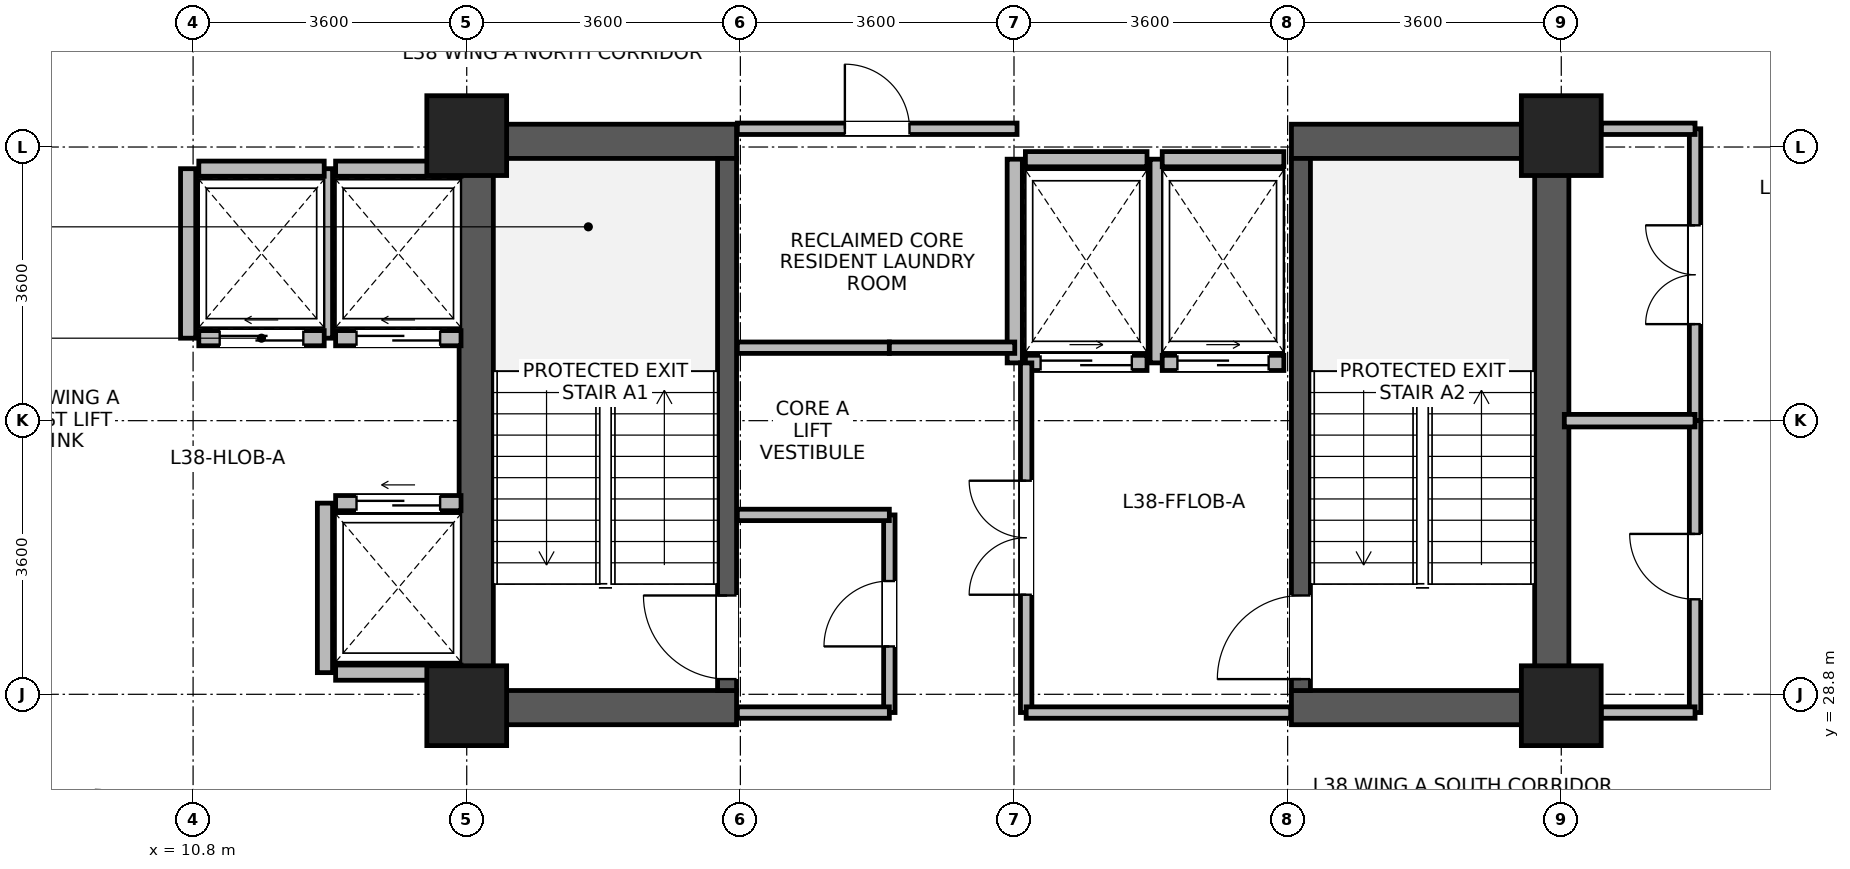
"""IFC4 building model, lengths in metres.
Left out: names, types, materials, properties, quantities, classifications, styles, units other than length and angle.
Written with IfcOpenShell. Run it as: python <this file> out.ifc"""

import sys

from ifc_helpers import new_model, si_unit, direction, frame, frame_2d, origin, origin_2d, place, context, subcontext, project, spatial, rectangle, extrude, source, transform, mapped, element, fill, save


model = new_model("IFC4")
c1 = context("Model", 3, precision=1e-05, world=origin(), true_north=direction((0.0, 1.0)))
c2 = subcontext(c1, "Body", "Model", "MODEL_VIEW")
j1 = project(units=[si_unit("LENGTHUNIT", "METRE"), si_unit("PLANEANGLEUNIT", "RADIAN")], contexts=[c1])
p1 = place(None, origin())
s1 = spatial("IfcSite", under=j1, at=p1, CompositionType="ELEMENT")
p2 = place(p1, origin())
s2 = spatial("IfcBuilding", under=s1, at=p2, CompositionType="ELEMENT")
p3 = place(p2, frame((0.0, 0.0, 151.3)))
s3 = spatial("IfcBuildingStorey", under=s2, at=p3, CompositionType="ELEMENT", Elevation=151.3)
for number, where, z_axis, x_axis in (
    (1, (14.525, 28.4, 0.0), (0.0, 0.0, 1.0), (0.0, 1.0, 0.0)),
    (2, (28.675, 28.4, 0.0), (0.0, 0.0, 1.0), (0.0, 1.0, 0.0)),
):
    element("IfcWall", number, at=place(p3, frame(where, z_axis=z_axis, x_axis=x_axis)), inside=s3, PredefinedType="SHEAR", context=c2, shape_type="SweptSolid", body=[
        extrude(rectangle(XDim=7.9, YDim=0.45, at=frame_2d((3.95, 0.0))), origin(), (0.0, 0.0, 1.0), 3.46),
    ])
for number, where, z_axis, x_axis in (
    (3, (14.75, 28.625, 0.0), (0.0, 0.0, 1.0), (1.0, 0.0, 0.0)),
    (4, (25.25, 28.625, 0.0), (0.0, 0.0, 1.0), (1.0, 0.0, 0.0)),
    (5, (14.75, 36.075, 0.0), (0.0, 0.0, 1.0), (1.0, 0.0, 0.0)),
    (6, (25.25, 36.075, 0.0), (0.0, 0.0, 1.0), (1.0, 0.0, 0.0)),
):
    element("IfcWall", number, at=place(p3, frame(where, z_axis=z_axis, x_axis=x_axis)), inside=s3, PredefinedType="SHEAR", context=c2, shape_type="SweptSolid", body=[
        extrude(rectangle(XDim=3.2, YDim=0.45, at=frame_2d((1.6, 0.0))), origin(), (0.0, 0.0, 1.0), 3.46),
    ])
p4 = place(p3, frame((17.825, 28.85, 0.0), z_axis=(0.0, 0.0, 1.0), x_axis=(0.0, 1.0, 0.0)))
e7 = element("IfcWall", 7, at=p4, inside=s3, PredefinedType="SHEAR", context=c2, shape_type="SweptSolid", body=[
    extrude(rectangle(XDim=7.0, YDim=0.25, at=frame_2d((3.5, 0.0))), origin(), (0.0, 0.0, 1.0), 3.46),
])
p5 = place(p4, frame((0.15, 0.0, 0.0)))
e8 = element("IfcOpeningElement", 8, at=p5, cuts=e7, PredefinedType="OPENING", context=c2, shape_type="SweptSolid", body=[
    extrude(rectangle(XDim=1.1, YDim=2.08, at=frame_2d((0.55, 1.04))), frame((0.0, 0.135, 0.0), z_axis=(0.0, -1.0, 0.0), x_axis=(1.0, 0.0, 0.0)), (0.0, 0.0, 1.0), 0.27),
])
p6 = place(p3, frame((25.375, 28.85, 0.0), z_axis=(0.0, 0.0, 1.0), x_axis=(0.0, 1.0, 0.0)))
e9 = element("IfcWall", 9, at=p6, inside=s3, PredefinedType="SHEAR", context=c2, shape_type="SweptSolid", body=[
    extrude(rectangle(XDim=7.0, YDim=0.25, at=frame_2d((3.5, 0.0))), origin(), (0.0, 0.0, 1.0), 3.46),
])
p7 = place(p6, frame((0.15, 0.0, 0.0)))
e10 = element("IfcOpeningElement", 10, at=p7, cuts=e9, PredefinedType="OPENING", context=c2, shape_type="SweptSolid", body=[
    extrude(rectangle(XDim=1.1, YDim=2.08, at=frame_2d((0.55, 1.04))), frame((0.0, 0.135, 0.0), z_axis=(0.0, -1.0, 0.0), x_axis=(1.0, 0.0, 0.0)), (0.0, 0.0, 1.0), 0.27),
])
m1 = source(origin(), c2, "Body", "SweptSolid", [
    extrude(rectangle(XDim=1.05, YDim=1.05, at=origin_2d()), origin(), (0.0, 0.0, 1.0), 3.7),
])
for number, where, z_axis, x_axis in (
    (11, (14.4, 28.65, 0.0), (0.0, 0.0, 1.0), (1.0, 0.0, 0.0)),
    (12, (14.4, 36.15, 0.0), (0.0, 0.0, 1.0), (1.0, 0.0, 0.0)),
    (13, (28.8, 28.65, 0.0), (0.0, 0.0, 1.0), (1.0, 0.0, 0.0)),
    (14, (28.8, 36.15, 0.0), (0.0, 0.0, 1.0), (1.0, 0.0, 0.0)),
):
    element("IfcColumn", number, at=place(p3, frame(where, z_axis=z_axis, x_axis=x_axis)), inside=s3, PredefinedType="COLUMN", context=c2, shape_type="MappedRepresentation", body=[
        mapped(m1, transform((0.0, 0.0, 0.0), x_axis=(1.0, 0.0, 0.0), y_axis=(0.0, 1.0, 0.0), z_axis=(0.0, 0.0, 1.0), scale=1.0)),
    ])
p8 = place(p3, frame((12.675, 33.485, 0.0), z_axis=(0.0, 0.0, 1.0), x_axis=(1.0, 0.0, 0.0)))
e15 = element("IfcWall", 15, at=p8, inside=s3, PredefinedType="PARTITIONING", context=c2, shape_type="SweptSolid", body=[
    extrude(rectangle(XDim=1.65, YDim=0.2, at=frame_2d((0.825, 0.0))), origin(), (0.0, 0.0, 1.0), 3.44),
])
p9 = place(p8, frame((0.275, 0.0, 0.0)))
e16 = element("IfcOpeningElement", 16, at=p9, cuts=e15, PredefinedType="OPENING", context=c2, shape_type="SweptSolid", body=[
    extrude(rectangle(XDim=1.1, YDim=2.12, at=frame_2d((0.55, 1.06))), frame((0.0, 0.11, 0.0), z_axis=(0.0, -1.0, 0.0), x_axis=(1.0, 0.0, 0.0)), (0.0, 0.0, 1.0), 0.22),
])
p10 = place(p3, frame((12.675, 35.715, 0.0), z_axis=(0.0, 0.0, 1.0), x_axis=(1.0, 0.0, 0.0)))
e17 = element("IfcWall", 17, at=p10, inside=s3, PredefinedType="PARTITIONING", context=c2, shape_type="SweptSolid", body=[
    extrude(rectangle(XDim=1.65, YDim=0.2, at=frame_2d((0.825, 0.0))), origin(), (0.0, 0.0, 1.0), 3.44),
])
p11 = place(p3, frame((12.535, 33.485, 0.0), z_axis=(0.0, 0.0, 1.0), x_axis=(0.0, 1.0, 0.0)))
e18 = element("IfcWall", 18, at=p11, inside=s3, PredefinedType="PARTITIONING", context=c2, shape_type="SweptSolid", body=[
    extrude(rectangle(XDim=2.23, YDim=0.2, at=frame_2d((1.115, 0.0))), origin(), (0.0, 0.0, 1.0), 3.44),
])
p12 = place(p3, frame((12.675, 29.085, 0.0), z_axis=(0.0, 0.0, 1.0), x_axis=(1.0, 0.0, 0.0)))
e19 = element("IfcWall", 19, at=p12, inside=s3, PredefinedType="PARTITIONING", context=c2, shape_type="SweptSolid", body=[
    extrude(rectangle(XDim=1.65, YDim=0.2, at=frame_2d((0.825, 0.0))), origin(), (0.0, 0.0, 1.0), 3.44),
])
p13 = place(p3, frame((12.675, 31.315, 0.0), z_axis=(0.0, 0.0, 1.0), x_axis=(1.0, 0.0, 0.0)))
e20 = element("IfcWall", 20, at=p13, inside=s3, PredefinedType="PARTITIONING", context=c2, shape_type="SweptSolid", body=[
    extrude(rectangle(XDim=1.65, YDim=0.2, at=frame_2d((0.825, 0.0))), origin(), (0.0, 0.0, 1.0), 3.44),
])
p14 = place(p13, frame((0.275, 0.0, 0.0)))
e21 = element("IfcOpeningElement", 21, at=p14, cuts=e20, PredefinedType="OPENING", context=c2, shape_type="SweptSolid", body=[
    extrude(rectangle(XDim=1.1, YDim=2.12, at=frame_2d((0.55, 1.06))), frame((0.0, 0.11, 0.0), z_axis=(0.0, -1.0, 0.0), x_axis=(1.0, 0.0, 0.0)), (0.0, 0.0, 1.0), 0.22),
])
p15 = place(p3, frame((12.535, 29.085, 0.0), z_axis=(0.0, 0.0, 1.0), x_axis=(0.0, 1.0, 0.0)))
e22 = element("IfcWall", 22, at=p15, inside=s3, PredefinedType="PARTITIONING", context=c2, shape_type="SweptSolid", body=[
    extrude(rectangle(XDim=2.23, YDim=0.2, at=frame_2d((1.115, 0.0))), origin(), (0.0, 0.0, 1.0), 3.44),
])
p16 = place(p3, frame((10.875, 33.485, 0.0), z_axis=(0.0, 0.0, 1.0), x_axis=(1.0, 0.0, 0.0)))
e23 = element("IfcWall", 23, at=p16, inside=s3, PredefinedType="PARTITIONING", context=c2, shape_type="SweptSolid", body=[
    extrude(rectangle(XDim=1.65, YDim=0.2, at=frame_2d((0.825, 0.0))), origin(), (0.0, 0.0, 1.0), 3.44),
])
p17 = place(p16, frame((0.275, 0.0, 0.0)))
e24 = element("IfcOpeningElement", 24, at=p17, cuts=e23, PredefinedType="OPENING", context=c2, shape_type="SweptSolid", body=[
    extrude(rectangle(XDim=1.1, YDim=2.12, at=frame_2d((0.55, 1.06))), frame((0.0, 0.11, 0.0), z_axis=(0.0, -1.0, 0.0), x_axis=(1.0, 0.0, 0.0)), (0.0, 0.0, 1.0), 0.22),
])
p18 = place(p3, frame((10.875, 35.715, 0.0), z_axis=(0.0, 0.0, 1.0), x_axis=(1.0, 0.0, 0.0)))
e25 = element("IfcWall", 25, at=p18, inside=s3, PredefinedType="PARTITIONING", context=c2, shape_type="SweptSolid", body=[
    extrude(rectangle(XDim=1.65, YDim=0.2, at=frame_2d((0.825, 0.0))), origin(), (0.0, 0.0, 1.0), 3.44),
])
p19 = place(p3, frame((10.735, 33.485, 0.0), z_axis=(0.0, 0.0, 1.0), x_axis=(0.0, 1.0, 0.0)))
e26 = element("IfcWall", 26, at=p19, inside=s3, PredefinedType="PARTITIONING", context=c2, shape_type="SweptSolid", body=[
    extrude(rectangle(XDim=2.23, YDim=0.2, at=frame_2d((1.115, 0.0))), origin(), (0.0, 0.0, 1.0), 3.44),
])
p20 = place(p3, frame((21.75, 33.16, 0.0), z_axis=(0.0, 0.0, 1.0), x_axis=(1.0, 0.0, 0.0)))
e27 = element("IfcWall", 27, at=p20, inside=s3, PredefinedType="PARTITIONING", context=c2, shape_type="SweptSolid", body=[
    extrude(rectangle(XDim=1.6, YDim=0.2, at=frame_2d((0.8, 0.0))), origin(), (0.0, 0.0, 1.0), 3.44),
])
p21 = place(p20, frame((0.2, 0.0, 0.0)))
e28 = element("IfcOpeningElement", 28, at=p21, cuts=e27, PredefinedType="OPENING", context=c2, shape_type="SweptSolid", body=[
    extrude(rectangle(XDim=1.2, YDim=2.12, at=frame_2d((0.6, 1.06))), frame((0.0, 0.11, 0.0), z_axis=(0.0, -1.0, 0.0), x_axis=(1.0, 0.0, 0.0)), (0.0, 0.0, 1.0), 0.22),
])
p22 = place(p3, frame((21.75, 35.84, 0.0), z_axis=(0.0, 0.0, 1.0), x_axis=(1.0, 0.0, 0.0)))
e29 = element("IfcWall", 29, at=p22, inside=s3, PredefinedType="PARTITIONING", context=c2, shape_type="SweptSolid", body=[
    extrude(rectangle(XDim=1.6, YDim=0.2, at=frame_2d((0.8, 0.0))), origin(), (0.0, 0.0, 1.0), 2.44),
])
for number, where, z_axis, x_axis in (
    (30, (21.61, 33.16, 0.0), (0.0, 0.0, 1.0), (0.0, 1.0, 0.0)),
    (31, (23.49, 33.16, 0.0), (0.0, 0.0, 1.0), (0.0, 1.0, 0.0)),
):
    element("IfcWall", number, at=place(p3, frame(where, z_axis=z_axis, x_axis=x_axis)), inside=s3, PredefinedType="PARTITIONING", context=c2, shape_type="SweptSolid", body=[
        extrude(rectangle(XDim=2.68, YDim=0.2, at=frame_2d((1.34, 0.0))), origin(), (0.0, 0.0, 1.0), 3.44),
    ])
p23 = place(p3, frame((23.55, 33.16, 0.0), z_axis=(0.0, 0.0, 1.0), x_axis=(1.0, 0.0, 0.0)))
e32 = element("IfcWall", 32, at=p23, inside=s3, PredefinedType="PARTITIONING", context=c2, shape_type="SweptSolid", body=[
    extrude(rectangle(XDim=1.6, YDim=0.2, at=frame_2d((0.8, 0.0))), origin(), (0.0, 0.0, 1.0), 3.44),
])
p24 = place(p23, frame((0.2, 0.0, 0.0)))
e33 = element("IfcOpeningElement", 33, at=p24, cuts=e32, PredefinedType="OPENING", context=c2, shape_type="SweptSolid", body=[
    extrude(rectangle(XDim=1.2, YDim=2.12, at=frame_2d((0.6, 1.06))), frame((0.0, 0.11, 0.0), z_axis=(0.0, -1.0, 0.0), x_axis=(1.0, 0.0, 0.0)), (0.0, 0.0, 1.0), 0.22),
])
p25 = place(p3, frame((23.55, 35.84, 0.0), z_axis=(0.0, 0.0, 1.0), x_axis=(1.0, 0.0, 0.0)))
e34 = element("IfcWall", 34, at=p25, inside=s3, PredefinedType="PARTITIONING", context=c2, shape_type="SweptSolid", body=[
    extrude(rectangle(XDim=1.6, YDim=0.2, at=frame_2d((0.8, 0.0))), origin(), (0.0, 0.0, 1.0), 2.44),
])
p26 = place(p3, frame((30.56, 32.4, 0.0), z_axis=(0.0, 0.0, 1.0), x_axis=(0.0, 1.0, 0.0)))
e35 = element("IfcWall", 35, at=p26, inside=s3, PredefinedType="PARTITIONING", context=c2, shape_type="SweptSolid", body=[
    extrude(rectangle(XDim=3.84, YDim=0.15, at=frame_2d((1.92, 0.0))), origin(), (0.0, 0.0, 1.0), 3.44),
])
p27 = place(p26, frame((1.27, 0.0, 0.0)))
e36 = element("IfcOpeningElement", 36, at=p27, cuts=e35, PredefinedType="OPENING", context=c2, shape_type="SweptSolid", body=[
    extrude(rectangle(XDim=1.3, YDim=2.12, at=frame_2d((0.65, 1.06))), frame((0.0, 0.085, 0.0), z_axis=(0.0, -1.0, 0.0), x_axis=(1.0, 0.0, 0.0)), (0.0, 0.0, 1.0), 0.17),
])
p28 = place(p3, frame((30.56, 28.56, 0.0), z_axis=(0.0, 0.0, 1.0), x_axis=(0.0, 1.0, 0.0)))
e37 = element("IfcWall", 37, at=p28, inside=s3, PredefinedType="PARTITIONING", context=c2, shape_type="SweptSolid", body=[
    extrude(rectangle(XDim=3.84, YDim=0.15, at=frame_2d((1.92, 0.0))), origin(), (0.0, 0.0, 1.0), 3.44),
])
p29 = place(p28, frame((1.49, 0.0, 0.0)))
e38 = element("IfcOpeningElement", 38, at=p29, cuts=e37, PredefinedType="OPENING", context=c2, shape_type="SweptSolid", body=[
    extrude(rectangle(XDim=0.86, YDim=2.02, at=frame_2d((0.43, 1.01))), frame((0.0, 0.085, 0.0), z_axis=(0.0, -1.0, 0.0), x_axis=(1.0, 0.0, 0.0)), (0.0, 0.0, 1.0), 0.17),
])
p30 = place(p3, frame((17.96, 36.24, 0.0), z_axis=(0.0, 0.0, 1.0), x_axis=(1.0, 0.0, 0.0)))
e39 = element("IfcWall", 39, at=p30, inside=s3, PredefinedType="PARTITIONING", context=c2, shape_type="SweptSolid", body=[
    extrude(rectangle(XDim=3.68, YDim=0.15, at=frame_2d((1.84, 0.0))), origin(), (0.0, 0.0, 1.0), 2.44),
])
p31 = place(p30, frame((1.415, 0.0, 0.0)))
e40 = element("IfcOpeningElement", 40, at=p31, cuts=e39, PredefinedType="OPENING", context=c2, shape_type="SweptSolid", body=[
    extrude(rectangle(XDim=0.85, YDim=2.04, at=frame_2d((0.425, 1.02))), frame((0.0, 0.085, 0.0), z_axis=(0.0, -1.0, 0.0), x_axis=(1.0, 0.0, 0.0)), (0.0, 0.0, 1.0), 0.17),
])
p32 = place(p3, frame((19.96, 28.56, 0.0), z_axis=(0.0, 0.0, 1.0), x_axis=(0.0, 1.0, 0.0)))
e41 = element("IfcWall", 41, at=p32, inside=s3, PredefinedType="PARTITIONING", context=c2, shape_type="SweptSolid", body=[
    extrude(rectangle(XDim=2.6, YDim=0.15, at=frame_2d((1.3, 0.0))), origin(), (0.0, 0.0, 1.0), 3.44),
])
p33 = place(p32, frame((0.87, 0.0, 0.0)))
e42 = element("IfcOpeningElement", 42, at=p33, cuts=e41, PredefinedType="OPENING", context=c2, shape_type="SweptSolid", body=[
    extrude(rectangle(XDim=0.86, YDim=2.02, at=frame_2d((0.43, 1.01))), frame((0.0, 0.085, 0.0), z_axis=(0.0, -1.0, 0.0), x_axis=(1.0, 0.0, 0.0)), (0.0, 0.0, 1.0), 0.17),
])
p34 = place(p3, frame((17.96, 28.56, 0.0), z_axis=(0.0, 0.0, 1.0), x_axis=(1.0, 0.0, 0.0)))
e43 = element("IfcWall", 43, at=p34, inside=s3, PredefinedType="PARTITIONING", context=c2, shape_type="SweptSolid", body=[
    extrude(rectangle(XDim=2.0, YDim=0.15, at=frame_2d((1.0, 0.0))), origin(), (0.0, 0.0, 1.0), 2.44),
])
for number, where, z_axis, x_axis in (
    (44, (17.96, 31.16, 0.0), (0.0, 0.0, 1.0), (1.0, 0.0, 0.0)),
    (45, (17.96, 33.36, 0.0), (0.0, 0.0, 1.0), (1.0, 0.0, 0.0)),
):
    element("IfcWall", number, at=place(p3, frame(where, z_axis=z_axis, x_axis=x_axis)), inside=s3, PredefinedType="PARTITIONING", context=c2, shape_type="SweptSolid", body=[
        extrude(rectangle(XDim=2.0, YDim=0.15, at=frame_2d((1.0, 0.0))), origin(), (0.0, 0.0, 1.0), 3.44),
    ])
for number, where, z_axis, x_axis in (
    (46, (29.325, 28.56, 0.0), (0.0, 0.0, 1.0), (1.0, 0.0, 0.0)),
    (47, (29.325, 36.24, 0.0), (0.0, 0.0, 1.0), (1.0, 0.0, 0.0)),
):
    element("IfcWall", number, at=place(p3, frame(where, z_axis=z_axis, x_axis=x_axis)), inside=s3, PredefinedType="PARTITIONING", context=c2, shape_type="SweptSolid", body=[
        extrude(rectangle(XDim=1.235, YDim=0.15, at=frame_2d((0.618, 0.0))), origin(), (0.0, 0.0, 1.0), 2.84),
    ])
p35 = place(p3, frame((19.96, 33.36, 0.0), z_axis=(0.0, 0.0, 1.0), x_axis=(1.0, 0.0, 0.0)))
e48 = element("IfcWall", 48, at=p35, inside=s3, PredefinedType="PARTITIONING", context=c2, shape_type="SweptSolid", body=[
    extrude(rectangle(XDim=1.65, YDim=0.15, at=frame_2d((0.825, 0.0))), origin(), (0.0, 0.0, 1.0), 3.44),
])
p36 = place(p3, frame((21.76, 28.56, 0.0), z_axis=(0.0, 0.0, 1.0), x_axis=(0.0, 1.0, 0.0)))
e49 = element("IfcWall", 49, at=p36, inside=s3, PredefinedType="PARTITIONING", context=c2, shape_type="SweptSolid", body=[
    extrude(rectangle(XDim=4.6, YDim=0.15, at=frame_2d((2.3, 0.0))), origin(), (0.0, 0.0, 1.0), 3.44),
])
p37 = place(p36, frame((1.55, 0.0, 0.0)))
e50 = element("IfcOpeningElement", 50, at=p37, cuts=e49, PredefinedType="OPENING", context=c2, shape_type="SweptSolid", body=[
    extrude(rectangle(XDim=1.5, YDim=2.1, at=frame_2d((0.75, 1.05))), frame((0.0, 0.085, 0.0), z_axis=(0.0, -1.0, 0.0), x_axis=(1.0, 0.0, 0.0)), (0.0, 0.0, 1.0), 0.17),
])
p38 = place(p3, frame((21.76, 28.56, 0.0), z_axis=(0.0, 0.0, 1.0), x_axis=(1.0, 0.0, 0.0)))
e51 = element("IfcWall", 51, at=p38, inside=s3, PredefinedType="PARTITIONING", context=c2, shape_type="SweptSolid", body=[
    extrude(rectangle(XDim=3.48, YDim=0.15, at=frame_2d((1.74, 0.0))), origin(), (0.0, 0.0, 1.0), 2.44),
])
p39 = place(p3, frame((28.84, 32.4, 0.0), z_axis=(0.0, 0.0, 1.0), x_axis=(1.0, 0.0, 0.0)))
e52 = element("IfcWall", 52, at=p39, inside=s3, PredefinedType="PARTITIONING", context=c2, shape_type="SweptSolid", body=[
    extrude(rectangle(XDim=1.72, YDim=0.165, at=frame_2d((0.86, 0.0))), origin(), (0.0, 0.0, 1.0), 3.44),
])
p40 = place(p5, origin())
e53 = element("IfcDoor", 53, at=p40, inside=s3, OperationType="SINGLE_SWING_RIGHT", PredefinedType="DOOR", context=c2, shape_type="SweptSolid", body=[
    extrude(rectangle(XDim=1.1, YDim=2.08, at=frame_2d((0.55, 1.04))), frame((0.0, 0.025, 0.0), z_axis=(0.0, -1.0, 0.0), x_axis=(1.0, 0.0, 0.0)), (0.0, 0.0, 1.0), 0.05),
])
fill(e8, e53)
p41 = place(p7, origin())
e54 = element("IfcDoor", 54, at=p41, inside=s3, OperationType="SINGLE_SWING_LEFT", PredefinedType="DOOR", context=c2, shape_type="SweptSolid", body=[
    extrude(rectangle(XDim=1.1, YDim=2.08, at=frame_2d((0.55, 1.04))), frame((0.0, 0.025, 0.0), z_axis=(0.0, -1.0, 0.0), x_axis=(1.0, 0.0, 0.0)), (0.0, 0.0, 1.0), 0.05),
])
fill(e10, e54)
p42 = place(p9, origin())
e55 = element("IfcDoor", 55, at=p42, inside=s3, OperationType="SLIDING_TO_LEFT", PredefinedType="DOOR", context=c2, shape_type="SweptSolid", body=[
    extrude(rectangle(XDim=1.1, YDim=2.12, at=frame_2d((0.55, 1.06))), frame((0.0, 0.025, 0.0), z_axis=(0.0, -1.0, 0.0), x_axis=(1.0, 0.0, 0.0)), (0.0, 0.0, 1.0), 0.05),
])
fill(e16, e55)
p43 = place(p14, origin())
e56 = element("IfcDoor", 56, at=p43, inside=s3, OperationType="SLIDING_TO_LEFT", PredefinedType="DOOR", context=c2, shape_type="SweptSolid", body=[
    extrude(rectangle(XDim=1.1, YDim=2.12, at=frame_2d((0.55, 1.06))), frame((0.0, 0.025, 0.0), z_axis=(0.0, -1.0, 0.0), x_axis=(1.0, 0.0, 0.0)), (0.0, 0.0, 1.0), 0.05),
])
fill(e21, e56)
p44 = place(p17, origin())
e57 = element("IfcDoor", 57, at=p44, inside=s3, OperationType="SLIDING_TO_LEFT", PredefinedType="DOOR", context=c2, shape_type="SweptSolid", body=[
    extrude(rectangle(XDim=1.1, YDim=2.12, at=frame_2d((0.55, 1.06))), frame((0.0, 0.025, 0.0), z_axis=(0.0, -1.0, 0.0), x_axis=(1.0, 0.0, 0.0)), (0.0, 0.0, 1.0), 0.05),
])
fill(e24, e57)
p45 = place(p21, origin())
e58 = element("IfcDoor", 58, at=p45, inside=s3, OperationType="SLIDING_TO_RIGHT", PredefinedType="DOOR", context=c2, shape_type="SweptSolid", body=[
    extrude(rectangle(XDim=1.2, YDim=2.12, at=frame_2d((0.6, 1.06))), frame((0.0, 0.025, 0.0), z_axis=(0.0, -1.0, 0.0), x_axis=(1.0, 0.0, 0.0)), (0.0, 0.0, 1.0), 0.05),
])
fill(e28, e58)
p46 = place(p24, origin())
e59 = element("IfcDoor", 59, at=p46, inside=s3, OperationType="SLIDING_TO_RIGHT", PredefinedType="DOOR", context=c2, shape_type="SweptSolid", body=[
    extrude(rectangle(XDim=1.2, YDim=2.12, at=frame_2d((0.6, 1.06))), frame((0.0, 0.025, 0.0), z_axis=(0.0, -1.0, 0.0), x_axis=(1.0, 0.0, 0.0)), (0.0, 0.0, 1.0), 0.05),
])
fill(e33, e59)
p47 = place(p27, origin())
e60 = element("IfcDoor", 60, at=p47, inside=s3, OperationType="DOUBLE_DOOR_SINGLE_SWING", PredefinedType="DOOR", context=c2, shape_type="SweptSolid", body=[
    extrude(rectangle(XDim=1.3, YDim=2.12, at=frame_2d((0.65, 1.06))), frame((0.0, 0.025, 0.0), z_axis=(0.0, -1.0, 0.0), x_axis=(1.0, 0.0, 0.0)), (0.0, 0.0, 1.0), 0.05),
])
fill(e36, e60)
p48 = place(p29, origin())
e61 = element("IfcDoor", 61, at=p48, inside=s3, OperationType="SINGLE_SWING_RIGHT", PredefinedType="DOOR", context=c2, shape_type="SweptSolid", body=[
    extrude(rectangle(XDim=0.86, YDim=2.02, at=frame_2d((0.43, 1.01))), frame((0.0, 0.025, 0.0), z_axis=(0.0, -1.0, 0.0), x_axis=(1.0, 0.0, 0.0)), (0.0, 0.0, 1.0), 0.05),
])
fill(e38, e61)
p49 = place(p31, origin())
e62 = element("IfcDoor", 62, at=p49, inside=s3, OperationType="SINGLE_SWING_LEFT", PredefinedType="DOOR", context=c2, shape_type="SweptSolid", body=[
    extrude(rectangle(XDim=0.85, YDim=2.04, at=frame_2d((0.425, 1.02))), frame((0.0, 0.025, 0.0), z_axis=(0.0, -1.0, 0.0), x_axis=(1.0, 0.0, 0.0)), (0.0, 0.0, 1.0), 0.05),
])
fill(e40, e62)
p50 = place(p33, origin())
e63 = element("IfcDoor", 63, at=p50, inside=s3, OperationType="SINGLE_SWING_LEFT", PredefinedType="DOOR", context=c2, shape_type="SweptSolid", body=[
    extrude(rectangle(XDim=0.86, YDim=2.02, at=frame_2d((0.43, 1.01))), frame((0.0, 0.025, 0.0), z_axis=(0.0, -1.0, 0.0), x_axis=(1.0, 0.0, 0.0)), (0.0, 0.0, 1.0), 0.05),
])
fill(e42, e63)
p51 = place(p37, origin())
e64 = element("IfcDoor", 64, at=p51, inside=s3, OperationType="DOUBLE_DOOR_SINGLE_SWING", PredefinedType="DOOR", context=c2, shape_type="SweptSolid", body=[
    extrude(rectangle(XDim=1.5, YDim=2.1, at=frame_2d((0.75, 1.05))), frame((0.0, 0.025, 0.0), z_axis=(0.0, -1.0, 0.0), x_axis=(1.0, 0.0, 0.0)), (0.0, 0.0, 1.0), 0.05),
])
fill(e50, e64)
save(model, sys.argv[1])
